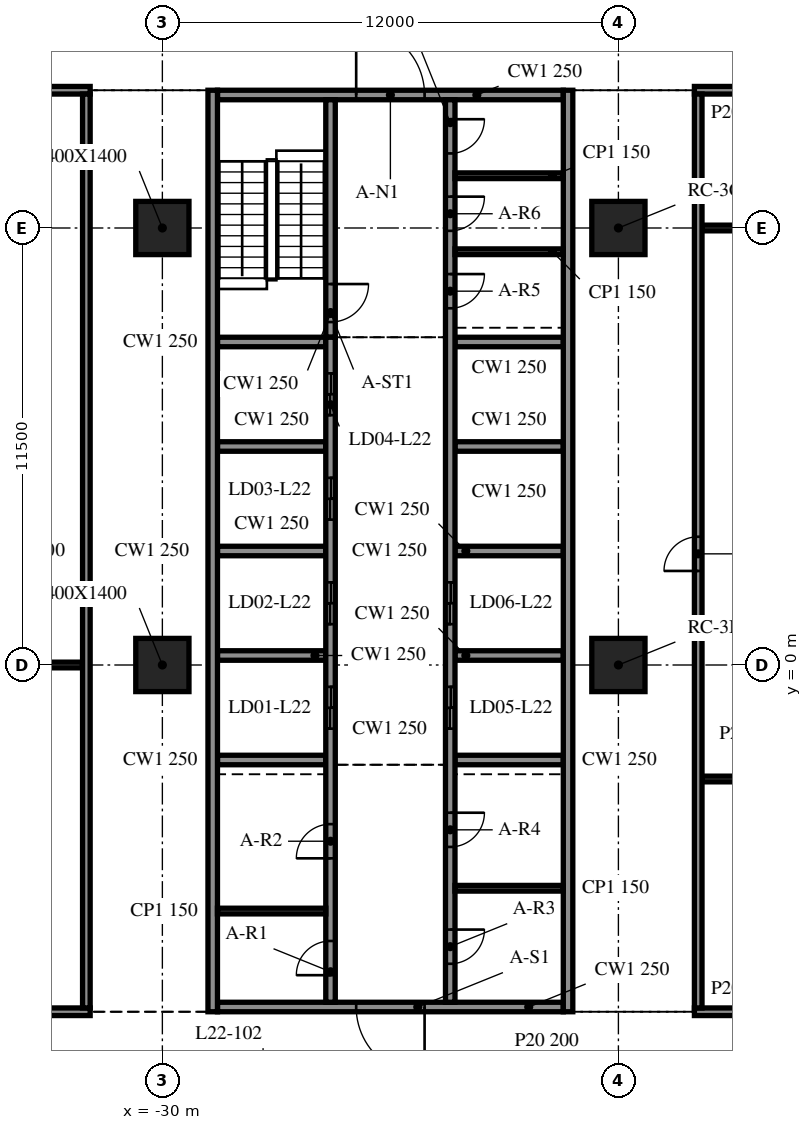
"""IFC4 building model, lengths in metres.
Left out: names, types, materials, properties, quantities, classifications, styles, units other than length and angle.
Written with IfcOpenShell. Run it as: python <this file> out.ifc"""

import sys

from ifc_helpers import new_model, si_unit, direction, frame, frame_2d, origin, origin_2d, place, context, subcontext, project, spatial, rectangle, extrude, element, fill, save


model = new_model("IFC4")
c1 = context("Model", 3, precision=1e-05, world=origin(), true_north=direction((0.0, 1.0)))
c2 = subcontext(c1, "Body", "Model", "MODEL_VIEW")
j1 = project(units=[si_unit("LENGTHUNIT", "METRE"), si_unit("PLANEANGLEUNIT", "RADIAN")], contexts=[c1])
p1 = place(None, origin())
s1 = spatial("IfcSite", under=j1, at=p1, CompositionType="ELEMENT")
p2 = place(p1, origin())
s2 = spatial("IfcBuilding", under=s1, at=p2, CompositionType="ELEMENT")
p3 = place(p2, frame((0.0, 0.0, 97.1)))
s3 = spatial("IfcBuildingStorey", under=s2, at=p3, CompositionType="ELEMENT", Elevation=97.1)
for number, where, z_axis, x_axis in (
    (1, (-30.0, 0.0, -0.34), (0.0, 0.0, 1.0), (1.0, 0.0, 0.0)),
    (2, (-30.0, 11.5, -0.34), (0.0, 0.0, 1.0), (1.0, 0.0, 0.0)),
    (3, (-18.0, 0.0, -0.34), (0.0, 0.0, 1.0), (1.0, 0.0, 0.0)),
    (4, (-18.0, 11.5, -0.34), (0.0, 0.0, 1.0), (1.0, 0.0, 0.0)),
):
    element("IfcColumn", number, at=place(p3, frame(where, z_axis=z_axis, x_axis=x_axis)), inside=s3, PredefinedType="COLUMN", context=c2, shape_type="SweptSolid", body=[
        extrude(rectangle(XDim=1.4, YDim=1.4, at=origin_2d()), origin(), (0.0, 0.0, 1.0), 4.1),
    ])
for number, where, z_axis, x_axis in (
    (5, (-28.675, 15.125, 0.0), (0.0, 0.0, 1.0), (0.0, -1.0, 0.0)),
    (6, (-19.325, -9.125, 0.0), (0.0, 0.0, 1.0), (0.0, 1.0, 0.0)),
):
    element("IfcWall", number, at=place(p3, frame(where, z_axis=z_axis, x_axis=x_axis)), inside=s3, PredefinedType="SOLIDWALL", context=c2, shape_type="SweptSolid", body=[
        extrude(rectangle(XDim=24.25, YDim=0.25, at=frame_2d((12.125, 0.0))), origin(), (0.0, 0.0, 1.0), 3.76),
    ])
p4 = place(p3, frame((-19.45, -9.0, 0.0), z_axis=(0.0, 0.0, 1.0), x_axis=(-1.0, 0.0, 0.0)))
e7 = element("IfcWall", 7, at=p4, inside=s3, PredefinedType="SOLIDWALL", context=c2, shape_type="SweptSolid", body=[
    extrude(rectangle(XDim=9.1, YDim=0.25, at=frame_2d((4.55, 0.0))), origin(), (0.0, 0.0, 1.0), 3.76),
])
p5 = place(p4, frame((3.65, 0.0, 0.0)))
e8 = element("IfcOpeningElement", 8, at=p5, cuts=e7, PredefinedType="OPENING", context=c2, shape_type="SweptSolid", body=[
    extrude(rectangle(XDim=1.8, YDim=2.1, at=frame_2d((0.9, 1.05))), frame((0.0, 0.135, 0.0), z_axis=(0.0, -1.0, 0.0), x_axis=(1.0, 0.0, 0.0)), (0.0, 0.0, 1.0), 0.27),
])
p6 = place(p3, frame((-28.55, 15.0, 0.0), z_axis=(0.0, 0.0, 1.0), x_axis=(1.0, 0.0, 0.0)))
e9 = element("IfcWall", 9, at=p6, inside=s3, PredefinedType="SOLIDWALL", context=c2, shape_type="SweptSolid", body=[
    extrude(rectangle(XDim=9.1, YDim=0.25, at=frame_2d((4.55, 0.0))), origin(), (0.0, 0.0, 1.0), 3.76),
])
p7 = place(p6, frame((3.65, 0.0, 0.0)))
e10 = element("IfcOpeningElement", 10, at=p7, cuts=e9, PredefinedType="OPENING", context=c2, shape_type="SweptSolid", body=[
    extrude(rectangle(XDim=1.8, YDim=2.1, at=frame_2d((0.9, 1.05))), frame((0.0, 0.135, 0.0), z_axis=(0.0, -1.0, 0.0), x_axis=(1.0, 0.0, 0.0)), (0.0, 0.0, 1.0), 0.27),
])
p8 = place(p3, frame((-25.575, -8.875, 0.0), z_axis=(0.0, 0.0, 1.0), x_axis=(0.0, 1.0, 0.0)))
e11 = element("IfcWall", 11, at=p8, inside=s3, PredefinedType="SOLIDWALL", context=c2, shape_type="SweptSolid", body=[
    extrude(rectangle(XDim=17.5, YDim=0.25, at=frame_2d((8.75, 0.0))), origin(), (0.0, 0.0, 1.0), 3.76),
])
p9 = place(p8, frame((7.2, 0.0, 0.0)))
e12 = element("IfcOpeningElement", 12, at=p9, cuts=e11, PredefinedType="OPENING", context=c2, shape_type="SweptSolid", body=[
    extrude(rectangle(XDim=1.1, YDim=2.1, at=frame_2d((0.55, 1.05))), frame((0.0, 0.135, 0.0), z_axis=(0.0, -1.0, 0.0), x_axis=(1.0, 0.0, 0.0)), (0.0, 0.0, 1.0), 0.27),
])
p10 = place(p8, frame((9.95, 0.0, 0.0)))
e13 = element("IfcOpeningElement", 13, at=p10, cuts=e11, PredefinedType="OPENING", context=c2, shape_type="SweptSolid", body=[
    extrude(rectangle(XDim=1.1, YDim=2.1, at=frame_2d((0.55, 1.05))), frame((0.0, 0.135, 0.0), z_axis=(0.0, -1.0, 0.0), x_axis=(1.0, 0.0, 0.0)), (0.0, 0.0, 1.0), 0.27),
])
p11 = place(p8, frame((12.7, 0.0, 0.0)))
e14 = element("IfcOpeningElement", 14, at=p11, cuts=e11, PredefinedType="OPENING", context=c2, shape_type="SweptSolid", body=[
    extrude(rectangle(XDim=1.1, YDim=2.1, at=frame_2d((0.55, 1.05))), frame((0.0, 0.135, 0.0), z_axis=(0.0, -1.0, 0.0), x_axis=(1.0, 0.0, 0.0)), (0.0, 0.0, 1.0), 0.27),
])
p12 = place(p8, frame((15.45, 0.0, 0.0)))
e15 = element("IfcOpeningElement", 15, at=p12, cuts=e11, PredefinedType="OPENING", context=c2, shape_type="SweptSolid", body=[
    extrude(rectangle(XDim=1.1, YDim=2.1, at=frame_2d((0.55, 1.05))), frame((0.0, 0.135, 0.0), z_axis=(0.0, -1.0, 0.0), x_axis=(1.0, 0.0, 0.0)), (0.0, 0.0, 1.0), 0.27),
])
p13 = place(p8, frame((0.712, 0.0, 0.0)))
e16 = element("IfcOpeningElement", 16, at=p13, cuts=e11, PredefinedType="OPENING", context=c2, shape_type="SweptSolid", body=[
    extrude(rectangle(XDim=0.9, YDim=2.1, at=frame_2d((0.45, 1.05))), frame((0.0, 0.135, 0.0), z_axis=(0.0, -1.0, 0.0), x_axis=(1.0, 0.0, 0.0)), (0.0, 0.0, 1.0), 0.27),
])
p14 = place(p8, frame((3.788, 0.0, 0.0)))
e17 = element("IfcOpeningElement", 17, at=p14, cuts=e11, PredefinedType="OPENING", context=c2, shape_type="SweptSolid", body=[
    extrude(rectangle(XDim=0.9, YDim=2.1, at=frame_2d((0.45, 1.05))), frame((0.0, 0.135, 0.0), z_axis=(0.0, -1.0, 0.0), x_axis=(1.0, 0.0, 0.0)), (0.0, 0.0, 1.0), 0.27),
])
p15 = place(p3, frame((-25.575, 14.875, 0.0), z_axis=(0.0, 0.0, 1.0), x_axis=(0.0, -1.0, 0.0)))
e18 = element("IfcWall", 18, at=p15, inside=s3, PredefinedType="SOLIDWALL", context=c2, shape_type="SweptSolid", body=[
    extrude(rectangle(XDim=6.25, YDim=0.25, at=frame_2d((3.125, 0.0))), origin(), (0.0, 0.0, 1.0), 3.76),
])
p16 = place(p15, frame((4.85, 0.0, 0.0)))
e19 = element("IfcOpeningElement", 19, at=p16, cuts=e18, PredefinedType="OPENING", context=c2, shape_type="SweptSolid", body=[
    extrude(rectangle(XDim=1.0, YDim=2.1, at=frame_2d((0.5, 1.05))), frame((0.0, 0.135, 0.0), z_axis=(0.0, -1.0, 0.0), x_axis=(1.0, 0.0, 0.0)), (0.0, 0.0, 1.0), 0.27),
])
p17 = place(p3, frame((-22.425, 14.875, 0.0), z_axis=(0.0, 0.0, 1.0), x_axis=(0.0, -1.0, 0.0)))
e20 = element("IfcWall", 20, at=p17, inside=s3, PredefinedType="SOLIDWALL", context=c2, shape_type="SweptSolid", body=[
    extrude(rectangle(XDim=23.75, YDim=0.25, at=frame_2d((11.875, 0.0))), origin(), (0.0, 0.0, 1.0), 3.76),
])
p18 = place(p17, frame((15.45, 0.0, 0.0)))
e21 = element("IfcOpeningElement", 21, at=p18, cuts=e20, PredefinedType="OPENING", context=c2, shape_type="SweptSolid", body=[
    extrude(rectangle(XDim=1.1, YDim=2.1, at=frame_2d((0.55, 1.05))), frame((0.0, 0.135, 0.0), z_axis=(0.0, -1.0, 0.0), x_axis=(1.0, 0.0, 0.0)), (0.0, 0.0, 1.0), 0.27),
])
p19 = place(p17, frame((12.7, 0.0, 0.0)))
e22 = element("IfcOpeningElement", 22, at=p19, cuts=e20, PredefinedType="OPENING", context=c2, shape_type="SweptSolid", body=[
    extrude(rectangle(XDim=1.1, YDim=2.1, at=frame_2d((0.55, 1.05))), frame((0.0, 0.135, 0.0), z_axis=(0.0, -1.0, 0.0), x_axis=(1.0, 0.0, 0.0)), (0.0, 0.0, 1.0), 0.27),
])
p20 = place(p17, frame((21.837, 0.0, 0.0)))
e23 = element("IfcOpeningElement", 23, at=p20, cuts=e20, PredefinedType="OPENING", context=c2, shape_type="SweptSolid", body=[
    extrude(rectangle(XDim=0.9, YDim=2.1, at=frame_2d((0.45, 1.05))), frame((0.0, 0.135, 0.0), z_axis=(0.0, -1.0, 0.0), x_axis=(1.0, 0.0, 0.0)), (0.0, 0.0, 1.0), 0.27),
])
p21 = place(p17, frame((18.762, 0.0, 0.0)))
e24 = element("IfcOpeningElement", 24, at=p21, cuts=e20, PredefinedType="OPENING", context=c2, shape_type="SweptSolid", body=[
    extrude(rectangle(XDim=0.9, YDim=2.1, at=frame_2d((0.45, 1.05))), frame((0.0, 0.135, 0.0), z_axis=(0.0, -1.0, 0.0), x_axis=(1.0, 0.0, 0.0)), (0.0, 0.0, 1.0), 0.27),
])
p22 = place(p17, frame((4.587, 0.0, 0.0)))
e25 = element("IfcOpeningElement", 25, at=p22, cuts=e20, PredefinedType="OPENING", context=c2, shape_type="SweptSolid", body=[
    extrude(rectangle(XDim=0.9, YDim=2.1, at=frame_2d((0.45, 1.05))), frame((0.0, 0.135, 0.0), z_axis=(0.0, -1.0, 0.0), x_axis=(1.0, 0.0, 0.0)), (0.0, 0.0, 1.0), 0.27),
])
p23 = place(p17, frame((2.55, 0.0, 0.0)))
e26 = element("IfcOpeningElement", 26, at=p23, cuts=e20, PredefinedType="OPENING", context=c2, shape_type="SweptSolid", body=[
    extrude(rectangle(XDim=0.9, YDim=2.1, at=frame_2d((0.45, 1.05))), frame((0.0, 0.135, 0.0), z_axis=(0.0, -1.0, 0.0), x_axis=(1.0, 0.0, 0.0)), (0.0, 0.0, 1.0), 0.27),
])
p24 = place(p17, frame((0.512, 0.0, 0.0)))
e27 = element("IfcOpeningElement", 27, at=p24, cuts=e20, PredefinedType="OPENING", context=c2, shape_type="SweptSolid", body=[
    extrude(rectangle(XDim=0.9, YDim=2.1, at=frame_2d((0.45, 1.05))), frame((0.0, 0.135, 0.0), z_axis=(0.0, -1.0, 0.0), x_axis=(1.0, 0.0, 0.0)), (0.0, 0.0, 1.0), 0.27),
])
for number, where, z_axis, x_axis in (
    (28, (-28.55, -2.5, 0.0), (0.0, 0.0, 1.0), (1.0, 0.0, 0.0)),
    (29, (-28.55, 0.25, 0.0), (0.0, 0.0, 1.0), (1.0, 0.0, 0.0)),
    (30, (-28.55, 3.0, 0.0), (0.0, 0.0, 1.0), (1.0, 0.0, 0.0)),
    (31, (-28.55, 5.75, 0.0), (0.0, 0.0, 1.0), (1.0, 0.0, 0.0)),
    (32, (-28.55, 8.5, 0.0), (0.0, 0.0, 1.0), (1.0, 0.0, 0.0)),
    (33, (-22.3, -2.5, 0.0), (0.0, 0.0, 1.0), (1.0, 0.0, 0.0)),
    (34, (-22.3, 0.25, 0.0), (0.0, 0.0, 1.0), (1.0, 0.0, 0.0)),
    (35, (-22.3, 3.0, 0.0), (0.0, 0.0, 1.0), (1.0, 0.0, 0.0)),
    (36, (-22.3, 5.75, 0.0), (0.0, 0.0, 1.0), (1.0, 0.0, 0.0)),
    (37, (-22.3, 8.5, 0.0), (0.0, 0.0, 1.0), (1.0, 0.0, 0.0)),
):
    element("IfcWall", number, at=place(p3, frame(where, z_axis=z_axis, x_axis=x_axis)), inside=s3, PredefinedType="SOLIDWALL", context=c2, shape_type="SweptSolid", body=[
        extrude(rectangle(XDim=2.85, YDim=0.25, at=frame_2d((1.425, 0.0))), origin(), (0.0, 0.0, 1.0), 3.76),
    ])
for number, where, z_axis, x_axis in (
    (38, (-28.55, -6.475, 0.0), (0.0, 0.0, 1.0), (1.0, 0.0, 0.0)),
    (39, (-22.3, -5.875, 0.0), (0.0, 0.0, 1.0), (1.0, 0.0, 0.0)),
    (40, (-22.3, 10.875, 0.0), (0.0, 0.0, 1.0), (1.0, 0.0, 0.0)),
    (41, (-22.3, 12.875, 0.0), (0.0, 0.0, 1.0), (1.0, 0.0, 0.0)),
):
    element("IfcWall", number, at=place(p3, frame(where, z_axis=z_axis, x_axis=x_axis)), inside=s3, PredefinedType="PARTITIONING", context=c2, shape_type="SweptSolid", body=[
        extrude(rectangle(XDim=2.85, YDim=0.15, at=frame_2d((1.425, 0.0))), origin(), (0.0, 0.0, 1.0), 3.76),
    ])
p25 = place(p3, frame((-39.95, -9.125, 0.0), z_axis=(0.0, 0.0, 1.0), x_axis=(1.0, 0.0, 0.0)))
e42 = element("IfcWall", 42, at=p25, inside=s3, PredefinedType="PARTITIONING", context=c2, shape_type="SweptSolid", body=[
    extrude(rectangle(XDim=8.05, YDim=0.2, at=frame_2d((4.025, 0.0))), origin(), (0.0, 0.0, 1.0), 3.76),
])
p26 = place(p25, frame((3.5, 0.0, 0.0)))
e43 = element("IfcOpeningElement", 43, at=p26, cuts=e42, PredefinedType="OPENING", context=c2, shape_type="SweptSolid", body=[
    extrude(rectangle(XDim=1.2, YDim=2.1, at=frame_2d((0.6, 1.05))), frame((0.0, 0.11, 0.0), z_axis=(0.0, -1.0, 0.0), x_axis=(1.0, 0.0, 0.0)), (0.0, 0.0, 1.0), 0.22),
])
p27 = place(p3, frame((-16.0, -9.125, 0.0), z_axis=(0.0, 0.0, 1.0), x_axis=(1.0, 0.0, 0.0)))
e44 = element("IfcWall", 44, at=p27, inside=s3, PredefinedType="PARTITIONING", context=c2, shape_type="SweptSolid", body=[
    extrude(rectangle(XDim=7.9, YDim=0.2, at=frame_2d((3.95, 0.0))), origin(), (0.0, 0.0, 1.0), 3.76),
])
p28 = place(p27, frame((3.5, 0.0, 0.0)))
e45 = element("IfcOpeningElement", 45, at=p28, cuts=e44, PredefinedType="OPENING", context=c2, shape_type="SweptSolid", body=[
    extrude(rectangle(XDim=1.0, YDim=2.1, at=frame_2d((0.5, 1.05))), frame((0.0, 0.11, 0.0), z_axis=(0.0, -1.0, 0.0), x_axis=(1.0, 0.0, 0.0)), (0.0, 0.0, 1.0), 0.22),
])
p29 = place(p3, frame((-15.8, -3.0, 0.0), z_axis=(0.0, 0.0, 1.0), x_axis=(1.0, 0.0, 0.0)))
e46 = element("IfcWall", 46, at=p29, inside=s3, PredefinedType="PARTITIONING", context=c2, shape_type="SweptSolid", body=[
    extrude(rectangle(XDim=7.5, YDim=0.15, at=frame_2d((3.75, 0.0))), origin(), (0.0, 0.0, 1.0), 3.76),
])
p30 = place(p3, frame((-39.75, 0.0, 0.0), z_axis=(0.0, 0.0, 1.0), x_axis=(1.0, 0.0, 0.0)))
e47 = element("IfcWall", 47, at=p30, inside=s3, PredefinedType="PARTITIONING", context=c2, shape_type="SweptSolid", body=[
    extrude(rectangle(XDim=7.65, YDim=0.15, at=frame_2d((3.825, 0.0))), origin(), (0.0, 0.0, 1.0), 3.76),
])
p31 = place(p3, frame((-15.8, 11.5, 0.0), z_axis=(0.0, 0.0, 1.0), x_axis=(1.0, 0.0, 0.0)))
e48 = element("IfcWall", 48, at=p31, inside=s3, PredefinedType="PARTITIONING", context=c2, shape_type="SweptSolid", body=[
    extrude(rectangle(XDim=7.5, YDim=0.15, at=frame_2d((3.75, 0.0))), origin(), (0.0, 0.0, 1.0), 3.76),
])
p32 = place(p3, frame((-39.95, 15.125, 0.0), z_axis=(0.0, 0.0, 1.0), x_axis=(1.0, 0.0, 0.0)))
e49 = element("IfcWall", 49, at=p32, inside=s3, PredefinedType="PARTITIONING", context=c2, shape_type="SweptSolid", body=[
    extrude(rectangle(XDim=8.05, YDim=0.2, at=frame_2d((4.025, 0.0))), origin(), (0.0, 0.0, 1.0), 3.76),
])
p33 = place(p32, frame((3.5, 0.0, 0.0)))
e50 = element("IfcOpeningElement", 50, at=p33, cuts=e49, PredefinedType="OPENING", context=c2, shape_type="SweptSolid", body=[
    extrude(rectangle(XDim=1.0, YDim=2.1, at=frame_2d((0.5, 1.05))), frame((0.0, 0.11, 0.0), z_axis=(0.0, -1.0, 0.0), x_axis=(1.0, 0.0, 0.0)), (0.0, 0.0, 1.0), 0.22),
])
p34 = place(p3, frame((-16.0, 15.125, 0.0), z_axis=(0.0, 0.0, 1.0), x_axis=(1.0, 0.0, 0.0)))
e51 = element("IfcWall", 51, at=p34, inside=s3, PredefinedType="PARTITIONING", context=c2, shape_type="SweptSolid", body=[
    extrude(rectangle(XDim=7.9, YDim=0.2, at=frame_2d((3.95, 0.0))), origin(), (0.0, 0.0, 1.0), 3.76),
])
p35 = place(p34, frame((3.5, 0.0, 0.0)))
e52 = element("IfcOpeningElement", 52, at=p35, cuts=e51, PredefinedType="OPENING", context=c2, shape_type="SweptSolid", body=[
    extrude(rectangle(XDim=1.0, YDim=2.1, at=frame_2d((0.5, 1.05))), frame((0.0, 0.11, 0.0), z_axis=(0.0, -1.0, 0.0), x_axis=(1.0, 0.0, 0.0)), (0.0, 0.0, 1.0), 0.22),
])
p36 = place(p3, frame((-32.0, -9.025, 0.0), z_axis=(0.0, 0.0, 1.0), x_axis=(0.0, 1.0, 0.0)))
e53 = element("IfcWall", 53, at=p36, inside=s3, PredefinedType="PARTITIONING", context=c2, shape_type="SweptSolid", body=[
    extrude(rectangle(XDim=24.05, YDim=0.2, at=frame_2d((12.025, 0.0))), origin(), (0.0, 0.0, 1.0), 3.76),
])
p37 = place(p3, frame((-15.9, -9.025, 0.0), z_axis=(0.0, 0.0, 1.0), x_axis=(0.0, 1.0, 0.0)))
e54 = element("IfcWall", 54, at=p37, inside=s3, PredefinedType="PARTITIONING", context=c2, shape_type="SweptSolid", body=[
    extrude(rectangle(XDim=24.05, YDim=0.2, at=frame_2d((12.025, 0.0))), origin(), (0.0, 0.0, 1.0), 3.76),
])
p38 = place(p37, frame((11.5, 0.0, 0.0)))
e55 = element("IfcOpeningElement", 55, at=p38, cuts=e54, PredefinedType="OPENING", context=c2, shape_type="SweptSolid", body=[
    extrude(rectangle(XDim=0.9, YDim=2.1, at=frame_2d((0.45, 1.05))), frame((0.0, 0.11, 0.0), z_axis=(0.0, -1.0, 0.0), x_axis=(1.0, 0.0, 0.0)), (0.0, 0.0, 1.0), 0.22),
])
p39 = place(p5, origin())
e56 = element("IfcDoor", 56, at=p39, inside=s3, OperationType="DOUBLE_DOOR_SINGLE_SWING", PredefinedType="DOOR", context=c2, shape_type="SweptSolid", body=[
    extrude(rectangle(XDim=1.8, YDim=2.1, at=frame_2d((0.9, 1.05))), frame((0.0, 0.025, 0.0), z_axis=(0.0, -1.0, 0.0), x_axis=(1.0, 0.0, 0.0)), (0.0, 0.0, 1.0), 0.05),
])
fill(e8, e56)
p40 = place(p7, origin())
e57 = element("IfcDoor", 57, at=p40, inside=s3, OperationType="DOUBLE_DOOR_SINGLE_SWING", PredefinedType="DOOR", context=c2, shape_type="SweptSolid", body=[
    extrude(rectangle(XDim=1.8, YDim=2.1, at=frame_2d((0.9, 1.05))), frame((0.0, 0.025, 0.0), z_axis=(0.0, -1.0, 0.0), x_axis=(1.0, 0.0, 0.0)), (0.0, 0.0, 1.0), 0.05),
])
fill(e10, e57)
p41 = place(p18, origin())
e58 = element("IfcDoor", 58, at=p41, inside=s3, OperationType="DOUBLE_DOOR_SLIDING", PredefinedType="DOOR", context=c2, shape_type="SweptSolid", body=[
    extrude(rectangle(XDim=1.1, YDim=2.1, at=frame_2d((0.55, 1.05))), frame((0.0, 0.025, 0.0), z_axis=(0.0, -1.0, 0.0), x_axis=(1.0, 0.0, 0.0)), (0.0, 0.0, 1.0), 0.05),
])
fill(e21, e58)
p42 = place(p19, origin())
e59 = element("IfcDoor", 59, at=p42, inside=s3, OperationType="DOUBLE_DOOR_SLIDING", PredefinedType="DOOR", context=c2, shape_type="SweptSolid", body=[
    extrude(rectangle(XDim=1.1, YDim=2.1, at=frame_2d((0.55, 1.05))), frame((0.0, 0.025, 0.0), z_axis=(0.0, -1.0, 0.0), x_axis=(1.0, 0.0, 0.0)), (0.0, 0.0, 1.0), 0.05),
])
fill(e22, e59)
p43 = place(p9, origin())
e60 = element("IfcDoor", 60, at=p43, inside=s3, OperationType="DOUBLE_DOOR_SLIDING", PredefinedType="DOOR", context=c2, shape_type="SweptSolid", body=[
    extrude(rectangle(XDim=1.1, YDim=2.1, at=frame_2d((0.55, 1.05))), frame((0.0, 0.025, 0.0), z_axis=(0.0, -1.0, 0.0), x_axis=(1.0, 0.0, 0.0)), (0.0, 0.0, 1.0), 0.05),
])
fill(e12, e60)
p44 = place(p10, origin())
e61 = element("IfcDoor", 61, at=p44, inside=s3, OperationType="DOUBLE_DOOR_SLIDING", PredefinedType="DOOR", context=c2, shape_type="SweptSolid", body=[
    extrude(rectangle(XDim=1.1, YDim=2.1, at=frame_2d((0.55, 1.05))), frame((0.0, 0.025, 0.0), z_axis=(0.0, -1.0, 0.0), x_axis=(1.0, 0.0, 0.0)), (0.0, 0.0, 1.0), 0.05),
])
fill(e13, e61)
p45 = place(p11, origin())
e62 = element("IfcDoor", 62, at=p45, inside=s3, OperationType="DOUBLE_DOOR_SLIDING", PredefinedType="DOOR", context=c2, shape_type="SweptSolid", body=[
    extrude(rectangle(XDim=1.1, YDim=2.1, at=frame_2d((0.55, 1.05))), frame((0.0, 0.025, 0.0), z_axis=(0.0, -1.0, 0.0), x_axis=(1.0, 0.0, 0.0)), (0.0, 0.0, 1.0), 0.05),
])
fill(e14, e62)
p46 = place(p12, origin())
e63 = element("IfcDoor", 63, at=p46, inside=s3, OperationType="DOUBLE_DOOR_SLIDING", PredefinedType="DOOR", context=c2, shape_type="SweptSolid", body=[
    extrude(rectangle(XDim=1.1, YDim=2.1, at=frame_2d((0.55, 1.05))), frame((0.0, 0.025, 0.0), z_axis=(0.0, -1.0, 0.0), x_axis=(1.0, 0.0, 0.0)), (0.0, 0.0, 1.0), 0.05),
])
fill(e15, e63)
p47 = place(p13, origin())
e64 = element("IfcDoor", 64, at=p47, inside=s3, OperationType="SINGLE_SWING_LEFT", PredefinedType="DOOR", context=c2, shape_type="SweptSolid", body=[
    extrude(rectangle(XDim=0.9, YDim=2.1, at=frame_2d((0.45, 1.05))), frame((0.0, 0.025, 0.0), z_axis=(0.0, -1.0, 0.0), x_axis=(1.0, 0.0, 0.0)), (0.0, 0.0, 1.0), 0.05),
])
fill(e16, e64)
p48 = place(p14, origin())
e65 = element("IfcDoor", 65, at=p48, inside=s3, OperationType="SINGLE_SWING_RIGHT", PredefinedType="DOOR", context=c2, shape_type="SweptSolid", body=[
    extrude(rectangle(XDim=0.9, YDim=2.1, at=frame_2d((0.45, 1.05))), frame((0.0, 0.025, 0.0), z_axis=(0.0, -1.0, 0.0), x_axis=(1.0, 0.0, 0.0)), (0.0, 0.0, 1.0), 0.05),
])
fill(e17, e65)
p49 = place(p20, origin())
e66 = element("IfcDoor", 66, at=p49, inside=s3, OperationType="SINGLE_SWING_LEFT", PredefinedType="DOOR", context=c2, shape_type="SweptSolid", body=[
    extrude(rectangle(XDim=0.9, YDim=2.1, at=frame_2d((0.45, 1.05))), frame((0.0, 0.025, 0.0), z_axis=(0.0, -1.0, 0.0), x_axis=(1.0, 0.0, 0.0)), (0.0, 0.0, 1.0), 0.05),
])
fill(e23, e66)
p50 = place(p21, origin())
e67 = element("IfcDoor", 67, at=p50, inside=s3, OperationType="SINGLE_SWING_RIGHT", PredefinedType="DOOR", context=c2, shape_type="SweptSolid", body=[
    extrude(rectangle(XDim=0.9, YDim=2.1, at=frame_2d((0.45, 1.05))), frame((0.0, 0.025, 0.0), z_axis=(0.0, -1.0, 0.0), x_axis=(1.0, 0.0, 0.0)), (0.0, 0.0, 1.0), 0.05),
])
fill(e24, e67)
p51 = place(p22, origin())
e68 = element("IfcDoor", 68, at=p51, inside=s3, OperationType="SINGLE_SWING_LEFT", PredefinedType="DOOR", context=c2, shape_type="SweptSolid", body=[
    extrude(rectangle(XDim=0.9, YDim=2.1, at=frame_2d((0.45, 1.05))), frame((0.0, 0.025, 0.0), z_axis=(0.0, -1.0, 0.0), x_axis=(1.0, 0.0, 0.0)), (0.0, 0.0, 1.0), 0.05),
])
fill(e25, e68)
p52 = place(p23, origin())
e69 = element("IfcDoor", 69, at=p52, inside=s3, OperationType="SINGLE_SWING_RIGHT", PredefinedType="DOOR", context=c2, shape_type="SweptSolid", body=[
    extrude(rectangle(XDim=0.9, YDim=2.1, at=frame_2d((0.45, 1.05))), frame((0.0, 0.025, 0.0), z_axis=(0.0, -1.0, 0.0), x_axis=(1.0, 0.0, 0.0)), (0.0, 0.0, 1.0), 0.05),
])
fill(e26, e69)
p53 = place(p24, origin())
e70 = element("IfcDoor", 70, at=p53, inside=s3, OperationType="SINGLE_SWING_LEFT", PredefinedType="DOOR", context=c2, shape_type="SweptSolid", body=[
    extrude(rectangle(XDim=0.9, YDim=2.1, at=frame_2d((0.45, 1.05))), frame((0.0, 0.025, 0.0), z_axis=(0.0, -1.0, 0.0), x_axis=(1.0, 0.0, 0.0)), (0.0, 0.0, 1.0), 0.05),
])
fill(e27, e70)
p54 = place(p16, origin())
e71 = element("IfcDoor", 71, at=p54, inside=s3, OperationType="SINGLE_SWING_RIGHT", PredefinedType="DOOR", context=c2, shape_type="SweptSolid", body=[
    extrude(rectangle(XDim=1.0, YDim=2.1, at=frame_2d((0.5, 1.05))), frame((0.0, 0.025, 0.0), z_axis=(0.0, -1.0, 0.0), x_axis=(1.0, 0.0, 0.0)), (0.0, 0.0, 1.0), 0.05),
])
fill(e19, e71)
p55 = place(p38, origin())
e72 = element("IfcDoor", 72, at=p55, inside=s3, OperationType="SINGLE_SWING_RIGHT", PredefinedType="DOOR", context=c2, shape_type="SweptSolid", body=[
    extrude(rectangle(XDim=0.9, YDim=2.1, at=frame_2d((0.45, 1.05))), frame((0.0, 0.025, 0.0), z_axis=(0.0, -1.0, 0.0), x_axis=(1.0, 0.0, 0.0)), (0.0, 0.0, 1.0), 0.05),
])
fill(e55, e72)
save(model, sys.argv[1])
